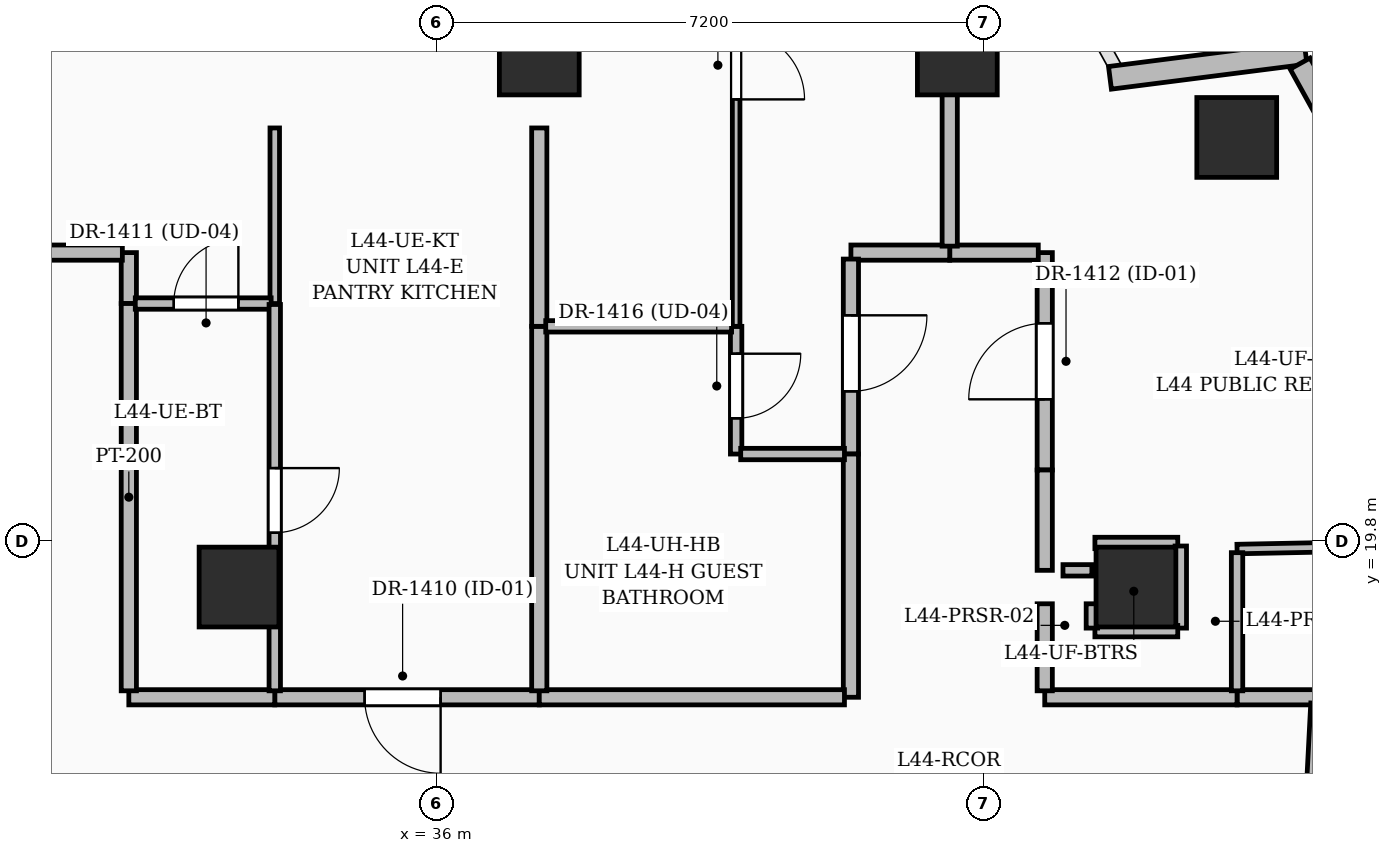
"""IFC4 building model, lengths in metres.
Left out: names, types, materials, properties, quantities, classifications, styles, units other than length and angle.
Written with IfcOpenShell. Run it as: python <this file> out.ifc"""

import sys

from ifc_helpers import new_model, si_unit, direction, frame, frame_2d, origin, origin_2d, place, context, subcontext, project, spatial, rectangle, extrude, element, fill, save


model = new_model("IFC4")
c1 = context("Model", 3, precision=1e-05, world=origin(), true_north=direction((0.0, 1.0)))
c2 = subcontext(c1, "Body", "Model", "MODEL_VIEW")
j1 = project(units=[si_unit("LENGTHUNIT", "METRE"), si_unit("PLANEANGLEUNIT", "RADIAN")], contexts=[c1])
p1 = place(None, origin())
s1 = spatial("IfcSite", under=j1, at=p1, CompositionType="ELEMENT")
p2 = place(p1, origin())
s2 = spatial("IfcBuilding", under=s1, at=p2, CompositionType="ELEMENT")
p3 = place(p2, frame((0.0, 0.0, 171.6)))
s3 = spatial("IfcBuildingStorey", under=s2, at=p3, CompositionType="ELEMENT", Elevation=171.6)
for number, where, z_axis, x_axis in (
    (1, (45.2, 19.2, 0.0), (0.0, 0.0, 1.0), (1.0, 0.0, 0.0)),
    (2, (42.85, 26.2, 0.0), (0.0, 0.0, 1.0), (1.0, 0.0, 0.0)),
    (3, (37.35, 26.2, 0.0), (0.0, 0.0, 1.0), (1.0, 0.0, 0.0)),
    (4, (33.4, 19.2, 0.0), (0.0, 0.0, 1.0), (1.0, 0.0, 0.0)),
    (5, (46.526, 25.115, 0.0), (0.0, 0.0, 1.0), (1.0, 0.0, 0.0)),
):
    element("IfcColumn", number, at=place(p3, frame(where, z_axis=z_axis, x_axis=x_axis)), inside=s3, PredefinedType="COLUMN", context=c2, shape_type="SweptSolid", body=[
        extrude(rectangle(XDim=1.05, YDim=1.05, at=origin_2d()), origin(), (0.0, 0.0, 1.0), 3.6),
    ])
p4 = place(p3, frame((44.858, 25.899, 0.0), z_axis=(0.0, 0.0, 1.0), x_axis=(0.991953049751, 0.126606267974, 0.0)))
e6 = element("IfcWall", 6, at=p4, inside=s3, PredefinedType="SOLIDWALL", context=c2, shape_type="SweptSolid", body=[
    extrude(rectangle(XDim=2.594, YDim=0.3, at=frame_2d((1.297, 0.0))), origin(), (0.0, 0.0, 1.0), 2.575),
])
p5 = place(p3, frame((47.36, 26.087, 0.0), z_axis=(0.0, 0.0, 1.0), x_axis=(0.484182040501, -0.874967286049, 0.0)))
e7 = element("IfcWall", 7, at=p5, inside=s3, PredefinedType="SOLIDWALL", context=c2, shape_type="SweptSolid", body=[
    extrude(rectangle(XDim=7.779, YDim=0.3, at=frame_2d((3.89, 0.0))), origin(), (0.0, 0.0, 1.0), 3.35),
])
p6 = place(p5, frame((2.745, 0.0, 0.6)))
e8 = element("IfcOpeningElement", 8, at=p6, cuts=e7, PredefinedType="OPENING", context=c2, shape_type="SweptSolid", body=[
    extrude(rectangle(XDim=1.5, YDim=2.1, at=frame_2d((0.75, 1.05))), frame((0.0, 0.16, 0.0), z_axis=(0.0, -1.0, 0.0), x_axis=(1.0, 0.0, 0.0)), (0.0, 0.0, 1.0), 0.32),
])
p7 = place(p3, frame((31.95, 22.93, 0.0), z_axis=(0.0, 0.0, 1.0), x_axis=(0.0, 1.0, 0.0)))
e9 = element("IfcWall", 9, at=p7, inside=s3, PredefinedType="PARTITIONING", context=c2, shape_type="SweptSolid", body=[
    extrude(rectangle(XDim=0.67, YDim=0.2, at=frame_2d((0.335, 0.0))), origin(), (0.0, 0.0, 1.0), 3.35),
])
p8 = place(p3, frame((37.35, 17.75, 0.0), z_axis=(0.0, 0.0, 1.0), x_axis=(-1.0, 0.0, 0.0)))
e10 = element("IfcWall", 10, at=p8, inside=s3, PredefinedType="PARTITIONING", context=c2, shape_type="SweptSolid", body=[
    extrude(rectangle(XDim=3.48, YDim=0.2, at=frame_2d((1.74, 0.0))), origin(), (0.0, 0.0, 1.0), 2.436),
])
p9 = place(p8, frame((1.298, 0.0, 0.0)))
e11 = element("IfcOpeningElement", 11, at=p9, cuts=e10, PredefinedType="OPENING", context=c2, shape_type="SweptSolid", body=[
    extrude(rectangle(XDim=1.0, YDim=2.2, at=frame_2d((0.5, 1.1))), frame((0.0, 0.11, 0.0), z_axis=(0.0, -1.0, 0.0), x_axis=(1.0, 0.0, 0.0)), (0.0, 0.0, 1.0), 0.22),
])
p10 = place(p3, frame((33.87, 17.75, 0.0), z_axis=(0.0, 0.0, 1.0), x_axis=(-1.0, 0.0, 0.0)))
e12 = element("IfcWall", 12, at=p10, inside=s3, PredefinedType="PARTITIONING", context=c2, shape_type="SweptSolid", body=[
    extrude(rectangle(XDim=1.92, YDim=0.2, at=frame_2d((0.96, 0.0))), origin(), (0.0, 0.0, 1.0), 2.436),
])
p11 = place(p3, frame((31.95, 17.835, 0.0), z_axis=(0.0, 0.0, 1.0), x_axis=(0.0, 1.0, 0.0)))
e13 = element("IfcWall", 13, at=p11, inside=s3, PredefinedType="PARTITIONING", context=c2, shape_type="SweptSolid", body=[
    extrude(rectangle(XDim=5.095, YDim=0.2, at=frame_2d((2.547, 0.0))), origin(), (0.0, 0.0, 1.0), 1.12),
])
p12 = place(p3, frame((44.0, 20.74, 0.0), z_axis=(0.0, 0.0, 1.0), x_axis=(0.0, 1.0, 0.0)))
e14 = element("IfcWall", 14, at=p12, inside=s3, PredefinedType="PARTITIONING", context=c2, shape_type="SweptSolid", body=[
    extrude(rectangle(XDim=2.86, YDim=0.2, at=frame_2d((1.43, 0.0))), origin(), (0.0, 0.0, 1.0), 2.436),
])
p13 = place(p12, frame((0.93, 0.0, 0.0)))
e15 = element("IfcOpeningElement", 15, at=p13, cuts=e14, PredefinedType="OPENING", context=c2, shape_type="SweptSolid", body=[
    extrude(rectangle(XDim=1.0, YDim=2.2, at=frame_2d((0.5, 1.1))), frame((0.0, 0.11, 0.0), z_axis=(0.0, -1.0, 0.0), x_axis=(1.0, 0.0, 0.0)), (0.0, 0.0, 1.0), 0.22),
])
p14 = place(p3, frame((43.915, 23.6, 0.0), z_axis=(0.0, 0.0, 1.0), x_axis=(-1.0, 0.0, 0.0)))
e16 = element("IfcWall", 16, at=p14, inside=s3, PredefinedType="PARTITIONING", context=c2, shape_type="SweptSolid", body=[
    extrude(rectangle(XDim=1.165, YDim=0.2, at=frame_2d((0.583, 0.0))), origin(), (0.0, 0.0, 1.0), 2.436),
])
p15 = place(p3, frame((47.6, 17.75, 0.0), z_axis=(0.0, 0.0, 1.0), x_axis=(-1.0, 0.0, 0.0)))
e17 = element("IfcWall", 17, at=p15, inside=s3, PredefinedType="PARTITIONING", context=c2, shape_type="SweptSolid", body=[
    extrude(rectangle(XDim=1.07, YDim=0.2, at=frame_2d((0.535, 0.0))), origin(), (0.0, 0.0, 1.0), 2.787),
])
p16 = place(p3, frame((46.53, 17.75, 0.0), z_axis=(0.0, 0.0, 1.0), x_axis=(-1.0, 0.0, 0.0)))
e18 = element("IfcWall", 18, at=p16, inside=s3, PredefinedType="PARTITIONING", context=c2, shape_type="SweptSolid", body=[
    extrude(rectangle(XDim=2.53, YDim=0.2, at=frame_2d((1.265, 0.0))), origin(), (0.0, 0.0, 1.0), 2.436),
])
p17 = place(p3, frame((44.0, 17.835, 0.0), z_axis=(0.0, 0.0, 1.0), x_axis=(0.0, 1.0, 0.0)))
e19 = element("IfcWall", 19, at=p17, inside=s3, PredefinedType="PARTITIONING", context=c2, shape_type="SweptSolid", body=[
    extrude(rectangle(XDim=1.145, YDim=0.2, at=frame_2d((0.573, 0.0))), origin(), (0.0, 0.0, 1.0), 3.35),
])
p18 = place(p3, frame((42.75, 23.6, 0.0), z_axis=(0.0, 0.0, 1.0), x_axis=(-1.0, 0.0, 0.0)))
e20 = element("IfcWall", 20, at=p18, inside=s3, PredefinedType="PARTITIONING", context=c2, shape_type="SweptSolid", body=[
    extrude(rectangle(XDim=1.3, YDim=0.2, at=frame_2d((0.65, 0.0))), origin(), (0.0, 0.0, 1.0), 3.35),
])
p19 = place(p3, frame((41.45, 23.515, 0.0), z_axis=(0.0, 0.0, 1.0), x_axis=(0.0, -1.0, 0.0)))
e21 = element("IfcWall", 21, at=p19, inside=s3, PredefinedType="PARTITIONING", context=c2, shape_type="SweptSolid", body=[
    extrude(rectangle(XDim=2.565, YDim=0.2, at=frame_2d((1.282, 0.0))), origin(), (0.0, 0.0, 1.0), 3.35),
])
p20 = place(p19, frame((0.74, 0.0, 0.0)))
e22 = element("IfcOpeningElement", 22, at=p20, cuts=e21, PredefinedType="OPENING", context=c2, shape_type="SweptSolid", body=[
    extrude(rectangle(XDim=1.0, YDim=2.2, at=frame_2d((0.5, 1.1))), frame((0.0, 0.11, 0.0), z_axis=(0.0, -1.0, 0.0), x_axis=(1.0, 0.0, 0.0)), (0.0, 0.0, 1.0), 0.22),
])
p21 = place(p3, frame((41.45, 20.95, 0.0), z_axis=(0.0, 0.0, 1.0), x_axis=(0.0, -1.0, 0.0)))
e23 = element("IfcWall", 23, at=p21, inside=s3, PredefinedType="PARTITIONING", context=c2, shape_type="SweptSolid", body=[
    extrude(rectangle(XDim=3.2, YDim=0.2, at=frame_2d((1.6, 0.0))), origin(), (0.0, 0.0, 1.0), 3.35),
])
p22 = place(p3, frame((41.365, 17.75, 0.0), z_axis=(0.0, 0.0, 1.0), x_axis=(-1.0, 0.0, 0.0)))
e24 = element("IfcWall", 24, at=p22, inside=s3, PredefinedType="PARTITIONING", context=c2, shape_type="SweptSolid", body=[
    extrude(rectangle(XDim=4.015, YDim=0.2, at=frame_2d((2.007, 0.0))), origin(), (0.0, 0.0, 1.0), 3.35),
])
p23 = place(p3, frame((33.87, 22.93, 0.0), z_axis=(0.0, 0.0, 1.0), x_axis=(0.0, 1.0, 0.0)))
e25 = element("IfcWall", 25, at=p23, inside=s3, PredefinedType="PARTITIONING", context=c2, shape_type="SweptSolid", body=[
    extrude(rectangle(XDim=2.31, YDim=0.125, at=frame_2d((1.155, 0.0))), origin(), (0.0, 0.0, 1.0), 2.787),
])
p24 = place(p3, frame((32.035, 22.93, 0.0), z_axis=(0.0, 0.0, 1.0), x_axis=(1.0, 0.0, 0.0)))
e26 = element("IfcWall", 26, at=p24, inside=s3, PredefinedType="PARTITIONING", context=c2, shape_type="SweptSolid", body=[
    extrude(rectangle(XDim=1.788, YDim=0.15, at=frame_2d((0.894, 0.0))), origin(), (0.0, 0.0, 1.0), 2.787),
])
p25 = place(p24, frame((0.506, 0.0, 0.0)))
e27 = element("IfcOpeningElement", 27, at=p25, cuts=e26, PredefinedType="OPENING", context=c2, shape_type="SweptSolid", body=[
    extrude(rectangle(XDim=0.85, YDim=2.1, at=frame_2d((0.425, 1.05))), frame((0.0, 0.085, 0.0), z_axis=(0.0, -1.0, 0.0), x_axis=(1.0, 0.0, 0.0)), (0.0, 0.0, 1.0), 0.17),
])
p26 = place(p3, frame((33.87, 22.917, 0.0), z_axis=(0.0, 0.0, 1.0), x_axis=(0.0, -1.0, 0.0)))
e28 = element("IfcWall", 28, at=p26, inside=s3, PredefinedType="PARTITIONING", context=c2, shape_type="SweptSolid", body=[
    extrude(rectangle(XDim=5.083, YDim=0.15, at=frame_2d((2.541, 0.0))), origin(), (0.0, 0.0, 1.0), 2.436),
])
p27 = place(p26, frame((2.153, 0.0, 0.0)))
e29 = element("IfcOpeningElement", 29, at=p27, cuts=e28, PredefinedType="OPENING", context=c2, shape_type="SweptSolid", body=[
    extrude(rectangle(XDim=0.85, YDim=2.1, at=frame_2d((0.425, 1.05))), frame((0.0, 0.085, 0.0), z_axis=(0.0, -1.0, 0.0), x_axis=(1.0, 0.0, 0.0)), (0.0, 0.0, 1.0), 0.17),
])
p28 = place(p3, frame((37.35, 17.835, 0.0), z_axis=(0.0, 0.0, 1.0), x_axis=(0.0, 1.0, 0.0)))
e30 = element("IfcWall", 30, at=p28, inside=s3, PredefinedType="PARTITIONING", context=c2, shape_type="SweptSolid", body=[
    extrude(rectangle(XDim=4.795, YDim=0.2, at=frame_2d((2.397, 0.0))), origin(), (0.0, 0.0, 1.0), 3.35),
])
p29 = place(p3, frame((37.35, 22.63, 0.0), z_axis=(0.0, 0.0, 1.0), x_axis=(0.0, 1.0, 0.0)))
e31 = element("IfcWall", 31, at=p29, inside=s3, PredefinedType="PARTITIONING", context=c2, shape_type="SweptSolid", body=[
    extrude(rectangle(XDim=2.61, YDim=0.2, at=frame_2d((1.305, 0.0))), origin(), (0.0, 0.0, 1.0), 3.35),
])
p30 = place(p3, frame((46.53, 19.7, 0.0), z_axis=(0.0, 0.0, 1.0), x_axis=(0.999798892802, 0.020054275168, 0.0)))
e32 = element("IfcWall", 32, at=p30, inside=s3, PredefinedType="PARTITIONING", context=c2, shape_type="SweptSolid", body=[
    extrude(rectangle(XDim=4.188, YDim=0.125, at=frame_2d((2.094, 0.0))), origin(), (0.0, 0.0, 1.0), 2.57),
])
p31 = place(p30, frame((1.688, 0.0, 0.0)))
e33 = element("IfcOpeningElement", 33, at=p31, cuts=e32, PredefinedType="OPENING", context=c2, shape_type="SweptSolid", body=[
    extrude(rectangle(XDim=0.95, YDim=2.2, at=frame_2d((0.475, 1.1))), frame((0.0, 0.072, 0.0), z_axis=(0.0, -1.0, 0.0), x_axis=(1.0, 0.0, 0.0)), (0.0, 0.0, 1.0), 0.145),
])
p32 = place(p3, frame((42.75, 29.62, 0.0), z_axis=(0.0, 0.0, 1.0), x_axis=(0.0, -1.0, 0.0)))
e34 = element("IfcWall", 34, at=p32, inside=s3, PredefinedType="PARTITIONING", context=c2, shape_type="SweptSolid", body=[
    extrude(rectangle(XDim=5.935, YDim=0.2, at=frame_2d((2.968, 0.0))), origin(), (0.0, 0.0, 1.0), 1.12),
])
p33 = place(p3, frame((46.53, 19.653, 0.0), z_axis=(0.0, 0.0, 1.0), x_axis=(0.0, -1.0, 0.0)))
e35 = element("IfcWall", 35, at=p33, inside=s3, PredefinedType="PARTITIONING", context=c2, shape_type="SweptSolid", body=[
    extrude(rectangle(XDim=1.818, YDim=0.15, at=frame_2d((0.909, 0.0))), origin(), (0.0, 0.0, 1.0), 2.787),
])
p34 = place(p3, frame((39.94, 22.63, 0.0), z_axis=(0.0, 0.0, 1.0), x_axis=(0.0, -1.0, 0.0)))
e36 = element("IfcWall", 36, at=p34, inside=s3, PredefinedType="PARTITIONING", context=c2, shape_type="SweptSolid", body=[
    extrude(rectangle(XDim=1.68, YDim=0.15, at=frame_2d((0.84, 0.0))), origin(), (0.0, 0.0, 1.0), 3.35),
])
p35 = place(p34, frame((0.36, 0.0, 0.0)))
e37 = element("IfcOpeningElement", 37, at=p35, cuts=e36, PredefinedType="OPENING", context=c2, shape_type="SweptSolid", body=[
    extrude(rectangle(XDim=0.85, YDim=2.1, at=frame_2d((0.425, 1.05))), frame((0.0, 0.085, 0.0), z_axis=(0.0, -1.0, 0.0), x_axis=(1.0, 0.0, 0.0)), (0.0, 0.0, 1.0), 0.17),
])
p36 = place(p3, frame((40.0, 20.95, 0.0), z_axis=(0.0, 0.0, 1.0), x_axis=(1.0, 0.0, 0.0)))
e38 = element("IfcWall", 38, at=p36, inside=s3, PredefinedType="PARTITIONING", context=c2, shape_type="SweptSolid", body=[
    extrude(rectangle(XDim=1.365, YDim=0.15, at=frame_2d((0.683, 0.0))), origin(), (0.0, 0.0, 1.0), 3.35),
])
p37 = place(p3, frame((39.94, 29.573, 0.0), z_axis=(0.0, 0.0, 1.0), x_axis=(0.0, -1.0, 0.0)))
e39 = element("IfcWall", 39, at=p37, inside=s3, PredefinedType="PARTITIONING", context=c2, shape_type="SweptSolid", body=[
    extrude(rectangle(XDim=6.943, YDim=0.1, at=frame_2d((3.471, 0.0))), origin(), (0.0, 0.0, 1.0), 2.37),
])
p38 = place(p37, frame((3.057, 0.0, 0.0)))
e40 = element("IfcOpeningElement", 40, at=p38, cuts=e39, PredefinedType="OPENING", context=c2, shape_type="SweptSolid", body=[
    extrude(rectangle(XDim=0.9, YDim=2.15, at=frame_2d((0.45, 1.075))), frame((0.0, 0.06, 0.0), z_axis=(0.0, -1.0, 0.0), x_axis=(1.0, 0.0, 0.0)), (0.0, 0.0, 1.0), 0.12),
])
p39 = place(p3, frame((39.88, 22.63, 0.0), z_axis=(0.0, 0.0, 1.0), x_axis=(-1.0, 0.0, 0.0)))
e41 = element("IfcWall", 41, at=p39, inside=s3, PredefinedType="PARTITIONING", context=c2, shape_type="SweptSolid", body=[
    extrude(rectangle(XDim=2.445, YDim=0.15, at=frame_2d((1.222, 0.0))), origin(), (0.0, 0.0, 1.0), 3.35),
])
p40 = place(p3, frame((31.865, 23.6, 0.0), z_axis=(0.0, 0.0, 1.0), x_axis=(-1.0, 0.0, 0.0)))
e42 = element("IfcWall", 42, at=p40, inside=s3, PredefinedType="PARTITIONING", context=c2, shape_type="SweptSolid", body=[
    extrude(rectangle(XDim=2.401, YDim=0.2, at=frame_2d((1.2, 0.0))), origin(), (0.0, 0.0, 1.0), 1.12),
])
p41 = place(p3, frame((44.0, 19.42, 0.0), z_axis=(0.0, 0.0, 1.0), x_axis=(0.0, 1.0, 0.0)))
e43 = element("IfcWall", 43, at=p41, inside=s3, PredefinedType="PARTITIONING", context=c2, shape_type="SweptSolid", body=[
    extrude(rectangle(XDim=1.32, YDim=0.2, at=frame_2d((0.66, 0.0))), origin(), (0.0, 0.0, 1.0), 3.35),
])
p42 = place(p3, frame((47.425, 14.28, 0.0), z_axis=(0.0, 0.0, 1.0), x_axis=(0.051569748391, 0.998669395271, 0.0)))
e44 = element("IfcWall", 44, at=p42, inside=s3, PredefinedType="PARTITIONING", context=c2, shape_type="SweptSolid", body=[
    extrude(rectangle(XDim=3.395, YDim=0.2, at=frame_2d((1.697, 0.0))), origin(), (0.0, 0.0, 1.0), 1.12),
])
p43 = place(p3, frame((44.24, 19.42, 0.0), z_axis=(0.0, 0.0, 1.0), x_axis=(1.0, 0.0, 0.0)))
e45 = element("IfcWall", 45, at=p43, inside=s3, PredefinedType="PARTITIONING", context=c2, shape_type="SweptSolid", body=[
    extrude(rectangle(XDim=0.38, YDim=0.15, at=frame_2d((0.19, 0.0))), origin(), (0.0, 0.0, 1.0), 3.35),
])
p44 = place(p3, frame((44.66, 19.78, 0.0), z_axis=(0.0, 0.0, 1.0), x_axis=(1.0, 0.0, 0.0)))
e46 = element("IfcWall", 46, at=p44, inside=s3, PredefinedType="PARTITIONING", context=c2, shape_type="SweptSolid", body=[
    extrude(rectangle(XDim=1.09, YDim=0.15, at=frame_2d((0.545, 0.0))), origin(), (0.0, 0.0, 1.0), 1.12),
])
p45 = place(p3, frame((45.79, 19.74, 0.0), z_axis=(0.0, 0.0, 1.0), x_axis=(0.0, -1.0, 0.0)))
e47 = element("IfcWall", 47, at=p45, inside=s3, PredefinedType="PARTITIONING", context=c2, shape_type="SweptSolid", body=[
    extrude(rectangle(XDim=1.08, YDim=0.15, at=frame_2d((0.54, 0.0))), origin(), (0.0, 0.0, 1.0), 1.12),
])
p46 = place(p3, frame((45.75, 18.62, 0.0), z_axis=(0.0, 0.0, 1.0), x_axis=(-1.0, 0.0, 0.0)))
e48 = element("IfcWall", 48, at=p46, inside=s3, PredefinedType="PARTITIONING", context=c2, shape_type="SweptSolid", body=[
    extrude(rectangle(XDim=1.09, YDim=0.15, at=frame_2d((0.545, 0.0))), origin(), (0.0, 0.0, 1.0), 2.436),
])
p47 = place(p3, frame((44.62, 18.66, 0.0), z_axis=(0.0, 0.0, 1.0), x_axis=(0.0, 1.0, 0.0)))
e49 = element("IfcWall", 49, at=p47, inside=s3, PredefinedType="PARTITIONING", context=c2, shape_type="SweptSolid", body=[
    extrude(rectangle(XDim=0.32, YDim=0.15, at=frame_2d((0.16, 0.0))), origin(), (0.0, 0.0, 1.0), 3.35),
])
p48 = place(p9, origin())
e50 = element("IfcDoor", 50, at=p48, inside=s3, OperationType="SINGLE_SWING_LEFT", PredefinedType="DOOR", context=c2, shape_type="SweptSolid", body=[
    extrude(rectangle(XDim=1.0, YDim=2.2, at=frame_2d((0.5, 1.1))), frame((0.0, 0.025, 0.0), z_axis=(0.0, -1.0, 0.0), x_axis=(1.0, 0.0, 0.0)), (0.0, 0.0, 1.0), 0.05),
])
fill(e11, e50)
p49 = place(p25, origin())
e51 = element("IfcDoor", 51, at=p49, inside=s3, OperationType="SINGLE_SWING_RIGHT", PredefinedType="DOOR", context=c2, shape_type="SweptSolid", body=[
    extrude(rectangle(XDim=0.85, YDim=2.1, at=frame_2d((0.425, 1.05))), frame((0.0, 0.025, 0.0), z_axis=(0.0, -1.0, 0.0), x_axis=(1.0, 0.0, 0.0)), (0.0, 0.0, 1.0), 0.05),
])
fill(e27, e51)
p50 = place(p13, origin())
e52 = element("IfcDoor", 52, at=p50, inside=s3, OperationType="SINGLE_SWING_LEFT", PredefinedType="DOOR", context=c2, shape_type="SweptSolid", body=[
    extrude(rectangle(XDim=1.0, YDim=2.2, at=frame_2d((0.5, 1.1))), frame((0.0, 0.025, 0.0), z_axis=(0.0, -1.0, 0.0), x_axis=(1.0, 0.0, 0.0)), (0.0, 0.0, 1.0), 0.05),
])
fill(e15, e52)
p51 = place(p20, origin())
e53 = element("IfcDoor", 53, at=p51, inside=s3, OperationType="SINGLE_SWING_LEFT", PredefinedType="DOOR", context=c2, shape_type="SweptSolid", body=[
    extrude(rectangle(XDim=1.0, YDim=2.2, at=frame_2d((0.5, 1.1))), frame((0.0, 0.025, 0.0), z_axis=(0.0, -1.0, 0.0), x_axis=(1.0, 0.0, 0.0)), (0.0, 0.0, 1.0), 0.05),
])
fill(e22, e53)
p52 = place(p35, origin())
e54 = element("IfcDoor", 54, at=p52, inside=s3, OperationType="SINGLE_SWING_LEFT", PredefinedType="DOOR", context=c2, shape_type="SweptSolid", body=[
    extrude(rectangle(XDim=0.85, YDim=2.1, at=frame_2d((0.425, 1.05))), frame((0.0, 0.025, 0.0), z_axis=(0.0, -1.0, 0.0), x_axis=(1.0, 0.0, 0.0)), (0.0, 0.0, 1.0), 0.05),
])
fill(e37, e54)
p53 = place(p38, origin())
e55 = element("IfcDoor", 55, at=p53, inside=s3, OperationType="SINGLE_SWING_RIGHT", PredefinedType="DOOR", context=c2, shape_type="SweptSolid", body=[
    extrude(rectangle(XDim=0.9, YDim=2.15, at=frame_2d((0.45, 1.075))), frame((0.0, 0.025, 0.0), z_axis=(0.0, -1.0, 0.0), x_axis=(1.0, 0.0, 0.0)), (0.0, 0.0, 1.0), 0.05),
])
fill(e40, e55)
p54 = place(p27, origin())
e56 = element("IfcDoor", 56, at=p54, inside=s3, OperationType="SINGLE_SWING_LEFT", PredefinedType="DOOR", context=c2, shape_type="SweptSolid", body=[
    extrude(rectangle(XDim=0.85, YDim=2.1, at=frame_2d((0.425, 1.05))), frame((0.0, 0.025, 0.0), z_axis=(0.0, -1.0, 0.0), x_axis=(1.0, 0.0, 0.0)), (0.0, 0.0, 1.0), 0.05),
])
fill(e29, e56)
save(model, sys.argv[1])
